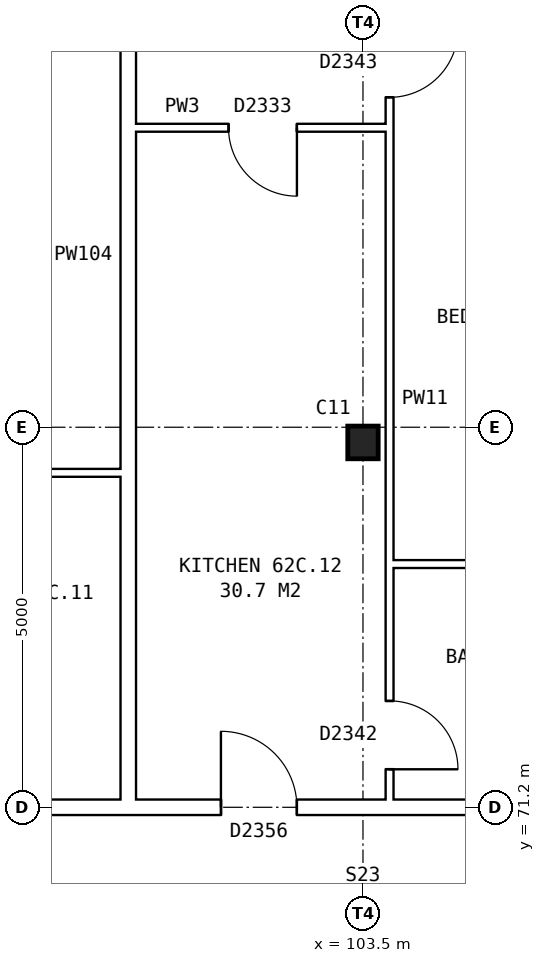
"""IFC4 building model, lengths in metres.
Left out: names, types, materials, properties, quantities, classifications, styles, units other than length and angle.
Written with IfcOpenShell. Run it as: python <this file> out.ifc"""

import sys

from ifc_helpers import new_model, si_unit, direction, frame, frame_2d, origin, origin_2d, place, context, subcontext, project, spatial, rectangle, i_section, extrude, element, fill, save


model = new_model("IFC4")
c1 = context("Model", 3, precision=1e-05, world=origin(), true_north=direction((0.0, 1.0)))
c2 = subcontext(c1, "Body", "Model", "MODEL_VIEW")
j1 = project(units=[si_unit("LENGTHUNIT", "METRE"), si_unit("PLANEANGLEUNIT", "RADIAN")], contexts=[c1])
p1 = place(None, origin())
s1 = spatial("IfcSite", under=j1, at=p1, CompositionType="ELEMENT")
p2 = place(p1, origin())
s2 = spatial("IfcBuilding", under=s1, at=p2, CompositionType="ELEMENT")
p3 = place(p2, frame((0.0, 0.0, 221.4)))
s3 = spatial("IfcBuildingStorey", under=s2, at=p3, CompositionType="ELEMENT", Elevation=221.4)
p4 = place(p3, frame((103.5, 76.0, 0.0), z_axis=(0.0, 0.0, 1.0), x_axis=(1.0, 0.0, 0.0)))
e1 = element("IfcColumn", 1, at=p4, inside=s3, PredefinedType="COLUMN", context=c2, shape_type="SweptSolid", body=[
    extrude(i_section(OverallWidth=0.4, OverallDepth=0.43, WebThickness=0.04, FlangeThickness=0.04, at=origin_2d()), origin(), (0.0, 0.0, 1.0), 2.85),
])
p5 = place(p3, frame((83.225, 71.2, 0.0), z_axis=(0.0, 0.0, 1.0), x_axis=(1.0, 0.0, 0.0)))
e2 = element("IfcWall", 2, at=p5, inside=s3, PredefinedType="PARTITIONING", context=c2, shape_type="SweptSolid", body=[
    extrude(rectangle(XDim=41.25, YDim=0.2, at=frame_2d((20.625, 0.0))), origin(), (0.0, 0.0, 1.0), 2.85),
])
p6 = place(p5, frame((4.656, 0.0, 0.0)))
e3 = element("IfcOpeningElement", 3, at=p6, cuts=e2, PredefinedType="OPENING", context=c2, shape_type="SweptSolid", body=[
    extrude(rectangle(XDim=1.0, YDim=2.1, at=frame_2d((0.5, 1.05))), frame((0.0, 0.11, 0.0), z_axis=(0.0, -1.0, 0.0), x_axis=(1.0, 0.0, 0.0)), (0.0, 0.0, 1.0), 0.22),
])
p7 = place(p5, frame((11.531, 0.0, 0.0)))
e4 = element("IfcOpeningElement", 4, at=p7, cuts=e2, PredefinedType="OPENING", context=c2, shape_type="SweptSolid", body=[
    extrude(rectangle(XDim=1.0, YDim=2.1, at=frame_2d((0.5, 1.05))), frame((0.0, 0.11, 0.0), z_axis=(0.0, -1.0, 0.0), x_axis=(1.0, 0.0, 0.0)), (0.0, 0.0, 1.0), 0.22),
])
p8 = place(p5, frame((18.406, 0.0, 0.0)))
e5 = element("IfcOpeningElement", 5, at=p8, cuts=e2, PredefinedType="OPENING", context=c2, shape_type="SweptSolid", body=[
    extrude(rectangle(XDim=1.0, YDim=2.1, at=frame_2d((0.5, 1.05))), frame((0.0, 0.11, 0.0), z_axis=(0.0, -1.0, 0.0), x_axis=(1.0, 0.0, 0.0)), (0.0, 0.0, 1.0), 0.22),
])
p9 = place(p5, frame((28.719, 0.0, 0.0)))
e6 = element("IfcOpeningElement", 6, at=p9, cuts=e2, PredefinedType="OPENING", context=c2, shape_type="SweptSolid", body=[
    extrude(rectangle(XDim=1.0, YDim=2.1, at=frame_2d((0.5, 1.05))), frame((0.0, 0.11, 0.0), z_axis=(0.0, -1.0, 0.0), x_axis=(1.0, 0.0, 0.0)), (0.0, 0.0, 1.0), 0.22),
])
p10 = place(p5, frame((35.594, 0.0, 0.0)))
e7 = element("IfcOpeningElement", 7, at=p10, cuts=e2, PredefinedType="OPENING", context=c2, shape_type="SweptSolid", body=[
    extrude(rectangle(XDim=1.0, YDim=2.1, at=frame_2d((0.5, 1.05))), frame((0.0, 0.11, 0.0), z_axis=(0.0, -1.0, 0.0), x_axis=(1.0, 0.0, 0.0)), (0.0, 0.0, 1.0), 0.22),
])
p11 = place(p3, frame((103.85, 74.4, 0.0), z_axis=(0.0, 0.0, 1.0), x_axis=(1.0, 0.0, 0.0)))
e8 = element("IfcWall", 8, at=p11, inside=s3, PredefinedType="PARTITIONING", context=c2, shape_type="SweptSolid", body=[
    extrude(rectangle(XDim=6.875, YDim=0.1, at=frame_2d((3.438, 0.0))), origin(), (0.0, 0.0, 1.0), 2.85),
])
p12 = place(p3, frame((96.975, 75.6, 0.0), z_axis=(0.0, 0.0, 1.0), x_axis=(1.0, 0.0, 0.0)))
e9 = element("IfcWall", 9, at=p12, inside=s3, PredefinedType="PARTITIONING", context=c2, shape_type="SweptSolid", body=[
    extrude(rectangle(XDim=3.337, YDim=0.1, at=frame_2d((1.668, 0.0))), origin(), (0.0, 0.0, 1.0), 2.85),
])
p13 = place(p3, frame((100.512, 80.14, 0.0), z_axis=(0.0, 0.0, 1.0), x_axis=(1.0, 0.0, 0.0)))
e10 = element("IfcWall", 10, at=p13, inside=s3, PredefinedType="PARTITIONING", context=c2, shape_type="SweptSolid", body=[
    extrude(rectangle(XDim=3.338, YDim=0.1, at=frame_2d((1.669, 0.0))), origin(), (0.0, 0.0, 1.0), 2.85),
])
p14 = place(p13, frame((1.219, 0.0, 0.0)))
e11 = element("IfcOpeningElement", 11, at=p14, cuts=e10, PredefinedType="OPENING", context=c2, shape_type="SweptSolid", body=[
    extrude(rectangle(XDim=0.9, YDim=2.1, at=frame_2d((0.45, 1.05))), frame((0.0, 0.06, 0.0), z_axis=(0.0, -1.0, 0.0), x_axis=(1.0, 0.0, 0.0)), (0.0, 0.0, 1.0), 0.12),
])
p15 = place(p3, frame((100.412, 71.3, 0.0), z_axis=(0.0, 0.0, 1.0), x_axis=(0.0, 1.0, 0.0)))
e12 = element("IfcWall", 12, at=p15, inside=s3, PredefinedType="PARTITIONING", context=c2, shape_type="SweptSolid", body=[
    extrude(rectangle(XDim=14.34, YDim=0.2, at=frame_2d((7.17, 0.0))), origin(), (0.0, 0.0, 1.0), 2.85),
])
p16 = place(p3, frame((103.85, 71.3, 0.0), z_axis=(0.0, 0.0, 1.0), x_axis=(0.0, 1.0, 0.0)))
e13 = element("IfcWall", 13, at=p16, inside=s3, PredefinedType="PARTITIONING", context=c2, shape_type="SweptSolid", body=[
    extrude(rectangle(XDim=14.34, YDim=0.1, at=frame_2d((7.17, 0.0))), origin(), (0.0, 0.0, 1.0), 2.85),
])
p17 = place(p16, frame((9.24, 0.0, 0.0)))
e14 = element("IfcOpeningElement", 14, at=p17, cuts=e13, PredefinedType="OPENING", context=c2, shape_type="SweptSolid", body=[
    extrude(rectangle(XDim=0.9, YDim=2.1, at=frame_2d((0.45, 1.05))), frame((0.0, 0.06, 0.0), z_axis=(0.0, -1.0, 0.0), x_axis=(1.0, 0.0, 0.0)), (0.0, 0.0, 1.0), 0.12),
])
p18 = place(p16, frame((0.4, 0.0, 0.0)))
e15 = element("IfcOpeningElement", 15, at=p18, cuts=e13, PredefinedType="OPENING", context=c2, shape_type="SweptSolid", body=[
    extrude(rectangle(XDim=0.9, YDim=2.1, at=frame_2d((0.45, 1.05))), frame((0.0, 0.06, 0.0), z_axis=(0.0, -1.0, 0.0), x_axis=(1.0, 0.0, 0.0)), (0.0, 0.0, 1.0), 0.12),
])
p19 = place(p17, frame((0.9, 0.0, 0.0), z_axis=(0.0, 0.0, 1.0), x_axis=(-1.0, 0.0, 0.0)))
e16 = element("IfcDoor", 16, at=p19, inside=s3, OperationType="SINGLE_SWING_LEFT", PredefinedType="DOOR", context=c2, shape_type="SweptSolid", body=[
    extrude(rectangle(XDim=0.9, YDim=2.1, at=frame_2d((0.45, 1.05))), frame((0.0, 0.025, 0.0), z_axis=(0.0, -1.0, 0.0), x_axis=(1.0, 0.0, 0.0)), (0.0, 0.0, 1.0), 0.05),
])
fill(e14, e16)
p20 = place(p8, origin())
e17 = element("IfcDoor", 17, at=p20, inside=s3, OperationType="SINGLE_SWING_LEFT", PredefinedType="DOOR", context=c2, shape_type="SweptSolid", body=[
    extrude(rectangle(XDim=1.0, YDim=2.1, at=frame_2d((0.5, 1.05))), frame((0.0, 0.025, 0.0), z_axis=(0.0, -1.0, 0.0), x_axis=(1.0, 0.0, 0.0)), (0.0, 0.0, 1.0), 0.05),
])
fill(e5, e17)
p21 = place(p14, frame((0.9, 0.0, 0.0), z_axis=(0.0, 0.0, 1.0), x_axis=(-1.0, 0.0, 0.0)))
e18 = element("IfcDoor", 18, at=p21, inside=s3, OperationType="SINGLE_SWING_LEFT", PredefinedType="DOOR", context=c2, shape_type="SweptSolid", body=[
    extrude(rectangle(XDim=0.9, YDim=2.1, at=frame_2d((0.45, 1.05))), frame((0.0, 0.025, 0.0), z_axis=(0.0, -1.0, 0.0), x_axis=(1.0, 0.0, 0.0)), (0.0, 0.0, 1.0), 0.05),
])
fill(e11, e18)
p22 = place(p18, frame((0.9, 0.0, 0.0), z_axis=(0.0, 0.0, 1.0), x_axis=(-1.0, 0.0, 0.0)))
e19 = element("IfcDoor", 19, at=p22, inside=s3, OperationType="SINGLE_SWING_RIGHT", PredefinedType="DOOR", context=c2, shape_type="SweptSolid", body=[
    extrude(rectangle(XDim=0.9, YDim=2.1, at=frame_2d((0.45, 1.05))), frame((0.0, 0.025, 0.0), z_axis=(0.0, -1.0, 0.0), x_axis=(1.0, 0.0, 0.0)), (0.0, 0.0, 1.0), 0.05),
])
fill(e15, e19)
save(model, sys.argv[1])
